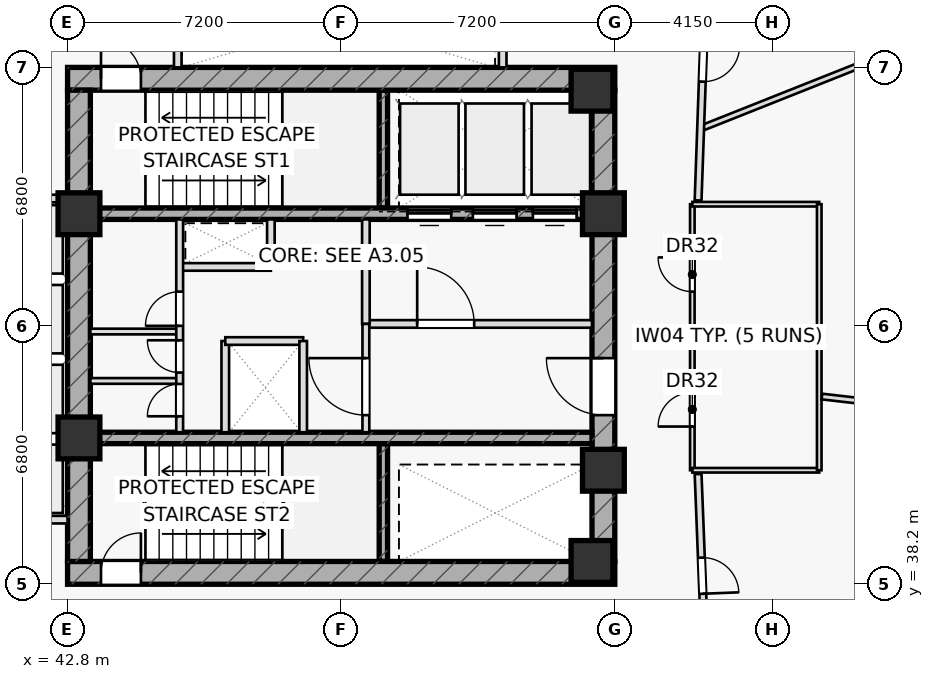
"""IFC4 building model, lengths in metres.
Left out: names, types, materials, properties, quantities, classifications, styles, units other than length and angle.
Written with IfcOpenShell. Run it as: python <this file> out.ifc"""

import sys

from ifc_helpers import new_model, si_unit, direction, frame, frame_2d, origin, origin_2d, place, context, subcontext, project, spatial, rectangle, extrude, element, fill, save


model = new_model("IFC4")
c1 = context("Model", 3, precision=1e-05, world=origin(), true_north=direction((0.0, 1.0)))
c2 = subcontext(c1, "Body", "Model", "MODEL_VIEW")
j1 = project(units=[si_unit("LENGTHUNIT", "METRE"), si_unit("PLANEANGLEUNIT", "RADIAN")], contexts=[c1])
p1 = place(None, origin())
s1 = spatial("IfcSite", under=j1, at=p1, CompositionType="ELEMENT")
p2 = place(p1, origin())
s2 = spatial("IfcBuilding", under=s1, at=p2, CompositionType="ELEMENT")
p3 = place(p2, frame((0.0, 0.0, 74.4)))
s3 = spatial("IfcBuildingStorey", under=s2, at=p3, CompositionType="ELEMENT", Elevation=74.4)
for number, where, z_axis, x_axis in (
    (1, (51.11, 48.1, 0.0), (0.0, 0.0, 1.0), (0.0, 1.0, 0.0)),
    (2, (51.11, 38.8, 0.0), (0.0, 0.0, 1.0), (0.0, 1.0, 0.0)),
):
    element("IfcWall", number, at=place(p3, frame(where, z_axis=z_axis, x_axis=x_axis)), inside=s3, PredefinedType="SHEAR", context=c2, shape_type="SweptSolid", body=[
        extrude(rectangle(XDim=3.1, YDim=0.22, at=frame_2d((1.55, 0.0))), origin(), (0.0, 0.0, 1.0), 3.6),
    ])
p4 = place(p3, frame((42.8, 51.5, 0.0), z_axis=(0.0, 0.0, 1.0), x_axis=(1.0, 0.0, 0.0)))
e3 = element("IfcWall", 3, at=p4, inside=s3, PredefinedType="SHEAR", context=c2, shape_type="SweptSolid", body=[
    extrude(rectangle(XDim=14.4, YDim=0.6, at=frame_2d((7.2, 0.0))), origin(), (0.0, 0.0, 1.0), 3.6),
])
p5 = place(p4, frame((0.88, 0.0, 0.0)))
e4 = element("IfcOpeningElement", 4, at=p5, cuts=e3, PredefinedType="OPENING", context=c2, shape_type="SweptSolid", body=[
    extrude(rectangle(XDim=1.05, YDim=2.2, at=frame_2d((0.525, 1.1))), frame((0.0, 0.31, 0.0), z_axis=(0.0, -1.0, 0.0), x_axis=(1.0, 0.0, 0.0)), (0.0, 0.0, 1.0), 0.62),
])
p6 = place(p3, frame((42.8, 38.5, 0.0), z_axis=(0.0, 0.0, 1.0), x_axis=(1.0, 0.0, 0.0)))
e5 = element("IfcWall", 5, at=p6, inside=s3, PredefinedType="SHEAR", context=c2, shape_type="SweptSolid", body=[
    extrude(rectangle(XDim=14.4, YDim=0.6, at=frame_2d((7.2, 0.0))), origin(), (0.0, 0.0, 1.0), 3.6),
])
p7 = place(p6, frame((0.88, 0.0, 0.0)))
e6 = element("IfcOpeningElement", 6, at=p7, cuts=e5, PredefinedType="OPENING", context=c2, shape_type="SweptSolid", body=[
    extrude(rectangle(XDim=1.05, YDim=2.2, at=frame_2d((0.525, 1.1))), frame((0.0, 0.31, 0.0), z_axis=(0.0, -1.0, 0.0), x_axis=(1.0, 0.0, 0.0)), (0.0, 0.0, 1.0), 0.62),
])
p8 = place(p3, frame((43.1, 38.8, 0.0), z_axis=(0.0, 0.0, 1.0), x_axis=(0.0, 1.0, 0.0)))
e7 = element("IfcWall", 7, at=p8, inside=s3, PredefinedType="SHEAR", context=c2, shape_type="SweptSolid", body=[
    extrude(rectangle(XDim=12.4, YDim=0.6, at=frame_2d((6.2, 0.0))), origin(), (0.0, 0.0, 1.0), 3.6),
])
p9 = place(p3, frame((56.9, 38.8, 0.0), z_axis=(0.0, 0.0, 1.0), x_axis=(0.0, 1.0, 0.0)))
e8 = element("IfcWall", 8, at=p9, inside=s3, PredefinedType="SHEAR", context=c2, shape_type="SweptSolid", body=[
    extrude(rectangle(XDim=12.4, YDim=0.6, at=frame_2d((6.2, 0.0))), origin(), (0.0, 0.0, 1.0), 3.6),
])
p10 = place(p9, frame((3.85, 0.0, 0.0)))
e9 = element("IfcOpeningElement", 9, at=p10, cuts=e8, PredefinedType="OPENING", context=c2, shape_type="SweptSolid", body=[
    extrude(rectangle(XDim=1.5, YDim=2.2, at=frame_2d((0.75, 1.1))), frame((0.0, 0.31, 0.0), z_axis=(0.0, -1.0, 0.0), x_axis=(1.0, 0.0, 0.0)), (0.0, 0.0, 1.0), 0.62),
])
p11 = place(p3, frame((43.4, 47.95, 0.0), z_axis=(0.0, 0.0, 1.0), x_axis=(1.0, 0.0, 0.0)))
e10 = element("IfcWall", 10, at=p11, inside=s3, PredefinedType="SHEAR", context=c2, shape_type="SweptSolid", body=[
    extrude(rectangle(XDim=13.2, YDim=0.3, at=frame_2d((6.6, 0.0))), origin(), (0.0, 0.0, 1.0), 3.6),
])
p12 = place(p11, frame((8.345, 0.0, 0.0)))
e11 = element("IfcOpeningElement", 11, at=p12, cuts=e10, PredefinedType="OPENING", context=c2, shape_type="SweptSolid", body=[
    extrude(rectangle(XDim=1.15, YDim=2.2, at=frame_2d((0.575, 1.1))), frame((0.0, 0.16, 0.0), z_axis=(0.0, -1.0, 0.0), x_axis=(1.0, 0.0, 0.0)), (0.0, 0.0, 1.0), 0.32),
])
p13 = place(p11, frame((10.065, 0.0, 0.0)))
e12 = element("IfcOpeningElement", 12, at=p13, cuts=e10, PredefinedType="OPENING", context=c2, shape_type="SweptSolid", body=[
    extrude(rectangle(XDim=1.15, YDim=2.2, at=frame_2d((0.575, 1.1))), frame((0.0, 0.16, 0.0), z_axis=(0.0, -1.0, 0.0), x_axis=(1.0, 0.0, 0.0)), (0.0, 0.0, 1.0), 0.32),
])
p14 = place(p11, frame((11.645, 0.0, 0.0)))
e13 = element("IfcOpeningElement", 13, at=p14, cuts=e10, PredefinedType="OPENING", context=c2, shape_type="SweptSolid", body=[
    extrude(rectangle(XDim=1.15, YDim=2.2, at=frame_2d((0.575, 1.1))), frame((0.0, 0.16, 0.0), z_axis=(0.0, -1.0, 0.0), x_axis=(1.0, 0.0, 0.0)), (0.0, 0.0, 1.0), 0.32),
])
p15 = place(p3, frame((43.4, 42.05, 0.0), z_axis=(0.0, 0.0, 1.0), x_axis=(1.0, 0.0, 0.0)))
e14 = element("IfcWall", 14, at=p15, inside=s3, PredefinedType="SHEAR", context=c2, shape_type="SweptSolid", body=[
    extrude(rectangle(XDim=13.2, YDim=0.3, at=frame_2d((6.6, 0.0))), origin(), (0.0, 0.0, 1.0), 3.6),
])
for number, where, z_axis, x_axis in (
    (15, (43.1, 47.95, 0.0), (0.0, 0.0, 1.0), (1.0, 0.0, 0.0)),
    (16, (56.9, 47.95, 0.0), (0.0, 0.0, 1.0), (1.0, 0.0, 0.0)),
    (17, (56.6, 51.2, 0.0), (0.0, 0.0, 1.0), (1.0, 0.0, 0.0)),
    (18, (43.1, 42.05, 0.0), (0.0, 0.0, 1.0), (1.0, 0.0, 0.0)),
    (19, (56.9, 41.2, 0.0), (0.0, 0.0, 1.0), (1.0, 0.0, 0.0)),
    (20, (56.6, 38.8, 0.0), (0.0, 0.0, 1.0), (1.0, 0.0, 0.0)),
):
    element("IfcColumn", number, at=place(p3, frame(where, z_axis=z_axis, x_axis=x_axis)), inside=s3, PredefinedType="COLUMN", context=c2, shape_type="SweptSolid", body=[
        extrude(rectangle(XDim=1.1, YDim=1.1, at=origin_2d()), origin(), (0.0, 0.0, 1.0), 3.6),
    ])
for number, where, z_axis, x_axis in (
    (21, (40.3, 39.9, 0.0), (0.0, 0.0, 1.0), (1.0, 0.0, 0.0)),
    (22, (40.3, 48.35, 0.0), (0.0, 0.0, 1.0), (1.0, 0.0, 0.0)),
    (23, (45.7, 51.8, 0.0), (0.0, 0.0, 1.0), (0.0, 1.0, 0.0)),
    (24, (54.25, 51.8, 0.0), (0.0, 0.0, 1.0), (0.0, 1.0, 0.0)),
):
    element("IfcWall", number, at=place(p3, frame(where, z_axis=z_axis, x_axis=x_axis)), inside=s3, PredefinedType="PARTITIONING", context=c2, shape_type="SweptSolid", body=[
        extrude(rectangle(XDim=2.5, YDim=0.2, at=frame_2d((1.25, 0.0))), origin(), (0.0, 0.0, 1.0), 3.6),
    ])
p16 = place(p3, frame((45.75, 46.55, 0.0), z_axis=(0.0, 0.0, 1.0), x_axis=(1.0, 0.0, 0.0)))
e25 = element("IfcWall", 25, at=p16, inside=s3, PredefinedType="PARTITIONING", context=c2, shape_type="SweptSolid", body=[
    extrude(rectangle(XDim=2.4, YDim=0.2, at=frame_2d((1.2, 0.0))), origin(), (0.0, 0.0, 1.0), 3.6),
])
p17 = place(p3, frame((48.15, 46.55, 0.0), z_axis=(0.0, 0.0, 1.0), x_axis=(0.0, 1.0, 0.0)))
e26 = element("IfcWall", 26, at=p17, inside=s3, PredefinedType="PARTITIONING", context=c2, shape_type="SweptSolid", body=[
    extrude(rectangle(XDim=1.25, YDim=0.2, at=frame_2d((0.625, 0.0))), origin(), (0.0, 0.0, 1.0), 3.6),
])
p18 = place(p3, frame((46.95, 42.2, 0.0), z_axis=(0.0, 0.0, 1.0), x_axis=(0.0, 1.0, 0.0)))
e27 = element("IfcWall", 27, at=p18, inside=s3, PredefinedType="PARTITIONING", context=c2, shape_type="SweptSolid", body=[
    extrude(rectangle(XDim=2.4, YDim=0.2, at=frame_2d((1.2, 0.0))), origin(), (0.0, 0.0, 1.0), 3.6),
])
p19 = place(p3, frame((46.95, 44.6, 0.0), z_axis=(0.0, 0.0, 1.0), x_axis=(1.0, 0.0, 0.0)))
e28 = element("IfcWall", 28, at=p19, inside=s3, PredefinedType="PARTITIONING", context=c2, shape_type="SweptSolid", body=[
    extrude(rectangle(XDim=2.05, YDim=0.2, at=frame_2d((1.025, 0.0))), origin(), (0.0, 0.0, 1.0), 3.6),
])
p20 = place(p3, frame((50.65, 45.05, 0.0), z_axis=(0.0, 0.0, 1.0), x_axis=(1.0, 0.0, 0.0)))
e29 = element("IfcWall", 29, at=p20, inside=s3, PredefinedType="PARTITIONING", context=c2, shape_type="SweptSolid", body=[
    extrude(rectangle(XDim=5.95, YDim=0.2, at=frame_2d((2.975, 0.0))), origin(), (0.0, 0.0, 1.0), 3.6),
])
p21 = place(p20, frame((1.35, 0.0, 0.0)))
e30 = element("IfcOpeningElement", 30, at=p21, cuts=e29, PredefinedType="OPENING", context=c2, shape_type="SweptSolid", body=[
    extrude(rectangle(XDim=1.5, YDim=2.2, at=frame_2d((0.75, 1.1))), frame((0.0, 0.11, 0.0), z_axis=(0.0, -1.0, 0.0), x_axis=(1.0, 0.0, 0.0)), (0.0, 0.0, 1.0), 0.22),
])
p22 = place(p3, frame((50.65, 45.05, 0.0), z_axis=(0.0, 0.0, 1.0), x_axis=(0.0, 1.0, 0.0)))
e31 = element("IfcWall", 31, at=p22, inside=s3, PredefinedType="PARTITIONING", context=c2, shape_type="SweptSolid", body=[
    extrude(rectangle(XDim=2.75, YDim=0.2, at=frame_2d((1.375, 0.0))), origin(), (0.0, 0.0, 1.0), 3.6),
])
p23 = place(p3, frame((50.65, 42.2, 0.0), z_axis=(0.0, 0.0, 1.0), x_axis=(0.0, 1.0, 0.0)))
e32 = element("IfcWall", 32, at=p23, inside=s3, PredefinedType="PARTITIONING", context=c2, shape_type="SweptSolid", body=[
    extrude(rectangle(XDim=2.85, YDim=0.18, at=frame_2d((1.425, 0.0))), origin(), (0.0, 0.0, 1.0), 3.6),
])
p24 = place(p23, frame((0.45, 0.0, 0.0)))
e33 = element("IfcOpeningElement", 33, at=p24, cuts=e32, PredefinedType="OPENING", context=c2, shape_type="SweptSolid", body=[
    extrude(rectangle(XDim=1.5, YDim=2.2, at=frame_2d((0.75, 1.1))), frame((0.0, 0.1, 0.0), z_axis=(0.0, -1.0, 0.0), x_axis=(1.0, 0.0, 0.0)), (0.0, 0.0, 1.0), 0.2),
])
for number, where, z_axis, x_axis in (
    (34, (43.4, 43.55, 0.0), (0.0, 0.0, 1.0), (1.0, 0.0, 0.0)),
    (35, (43.4, 44.85, 0.0), (0.0, 0.0, 1.0), (1.0, 0.0, 0.0)),
):
    element("IfcWall", number, at=place(p3, frame(where, z_axis=z_axis, x_axis=x_axis)), inside=s3, PredefinedType="PARTITIONING", context=c2, shape_type="SweptSolid", body=[
        extrude(rectangle(XDim=2.35, YDim=0.15, at=frame_2d((1.175, 0.0))), origin(), (0.0, 0.0, 1.0), 3.6),
    ])
p25 = place(p3, frame((45.75, 42.2, 0.0), z_axis=(0.0, 0.0, 1.0), x_axis=(0.0, 1.0, 0.0)))
e36 = element("IfcWall", 36, at=p25, inside=s3, PredefinedType="PARTITIONING", context=c2, shape_type="SweptSolid", body=[
    extrude(rectangle(XDim=5.6, YDim=0.18, at=frame_2d((2.8, 0.0))), origin(), (0.0, 0.0, 1.0), 3.6),
])
p26 = place(p25, frame((0.42, 0.0, 0.0)))
e37 = element("IfcOpeningElement", 37, at=p26, cuts=e36, PredefinedType="OPENING", context=c2, shape_type="SweptSolid", body=[
    extrude(rectangle(XDim=0.85, YDim=2.05, at=frame_2d((0.425, 1.025))), frame((0.0, 0.1, 0.0), z_axis=(0.0, -1.0, 0.0), x_axis=(1.0, 0.0, 0.0)), (0.0, 0.0, 1.0), 0.2),
])
p27 = place(p25, frame((1.57, 0.0, 0.0)))
e38 = element("IfcOpeningElement", 38, at=p27, cuts=e36, PredefinedType="OPENING", context=c2, shape_type="SweptSolid", body=[
    extrude(rectangle(XDim=0.85, YDim=2.05, at=frame_2d((0.425, 1.025))), frame((0.0, 0.1, 0.0), z_axis=(0.0, -1.0, 0.0), x_axis=(1.0, 0.0, 0.0)), (0.0, 0.0, 1.0), 0.2),
])
p28 = place(p25, frame((2.8, 0.0, 0.0)))
e39 = element("IfcOpeningElement", 39, at=p28, cuts=e36, PredefinedType="OPENING", context=c2, shape_type="SweptSolid", body=[
    extrude(rectangle(XDim=0.9, YDim=2.05, at=frame_2d((0.45, 1.025))), frame((0.0, 0.1, 0.0), z_axis=(0.0, -1.0, 0.0), x_axis=(1.0, 0.0, 0.0)), (0.0, 0.0, 1.0), 0.2),
])
p29 = place(p3, frame((59.24, 41.2, 0.0), z_axis=(0.0, 0.0, 1.0), x_axis=(0.0, 1.0, 0.0)))
e40 = element("IfcWall", 40, at=p29, inside=s3, PredefinedType="PARTITIONING", context=c2, shape_type="SweptSolid", body=[
    extrude(rectangle(XDim=7.0, YDim=0.12, at=frame_2d((3.5, 0.0))), origin(), (0.0, 0.0, 1.0), 3.6),
])
p30 = place(p29, frame((1.15, 0.0, 0.0)))
e41 = element("IfcOpeningElement", 41, at=p30, cuts=e40, PredefinedType="OPENING", context=c2, shape_type="SweptSolid", body=[
    extrude(rectangle(XDim=0.9, YDim=2.05, at=frame_2d((0.45, 1.025))), frame((0.0, 0.07, 0.0), z_axis=(0.0, -1.0, 0.0), x_axis=(1.0, 0.0, 0.0)), (0.0, 0.0, 1.0), 0.14),
])
p31 = place(p29, frame((4.7, 0.0, 0.0)))
e42 = element("IfcOpeningElement", 42, at=p31, cuts=e40, PredefinedType="OPENING", context=c2, shape_type="SweptSolid", body=[
    extrude(rectangle(XDim=0.9, YDim=2.05, at=frame_2d((0.45, 1.025))), frame((0.0, 0.07, 0.0), z_axis=(0.0, -1.0, 0.0), x_axis=(1.0, 0.0, 0.0)), (0.0, 0.0, 1.0), 0.14),
])
p32 = place(p3, frame((59.24, 41.2, 0.0), z_axis=(0.0, 0.0, 1.0), x_axis=(1.0, 0.0, 0.0)))
e43 = element("IfcWall", 43, at=p32, inside=s3, PredefinedType="PARTITIONING", context=c2, shape_type="SweptSolid", body=[
    extrude(rectangle(XDim=3.34, YDim=0.12, at=frame_2d((1.67, 0.0))), origin(), (0.0, 0.0, 1.0), 2.975),
])
for number, where, z_axis, x_axis in (
    (44, (59.24, 44.65, 0.0), (0.0, 0.0, 1.0), (1.0, 0.0, 0.0)),
    (45, (59.24, 48.2, 0.0), (0.0, 0.0, 1.0), (1.0, 0.0, 0.0)),
):
    element("IfcWall", number, at=place(p3, frame(where, z_axis=z_axis, x_axis=x_axis)), inside=s3, PredefinedType="PARTITIONING", context=c2, shape_type="SweptSolid", body=[
        extrude(rectangle(XDim=3.34, YDim=0.12, at=frame_2d((1.67, 0.0))), origin(), (0.0, 0.0, 1.0), 3.6),
    ])
p33 = place(p3, frame((62.58, 41.2, 0.0), z_axis=(0.0, 0.0, 1.0), x_axis=(0.0, 1.0, 0.0)))
e46 = element("IfcWall", 46, at=p33, inside=s3, PredefinedType="PARTITIONING", context=c2, shape_type="SweptSolid", body=[
    extrude(rectangle(XDim=7.0, YDim=0.12, at=frame_2d((3.5, 0.0))), origin(), (0.0, 0.0, 1.0), 3.6),
])
p34 = place(p3, frame((62.65, 43.139, 0.0), z_axis=(0.0, 0.0, 1.0), x_axis=(0.993507819436, -0.113763846275, 0.0)))
e47 = element("IfcWall", 47, at=p34, inside=s3, PredefinedType="PARTITIONING", context=c2, shape_type="SweptSolid", body=[
    extrude(rectangle(XDim=13.121, YDim=0.15, at=frame_2d((6.561, 0.0))), origin(), (0.0, 0.0, 1.0), 2.975),
])
p35 = place(p34, frame((1.35, 0.0, 0.0)))
e48 = element("IfcOpeningElement", 48, at=p35, cuts=e47, PredefinedType="OPENING", context=c2, shape_type="SweptSolid", body=[
    extrude(rectangle(XDim=0.95, YDim=2.05, at=frame_2d((0.475, 1.025))), frame((0.0, 0.085, 0.0), z_axis=(0.0, -1.0, 0.0), x_axis=(1.0, 0.0, 0.0)), (0.0, 0.0, 1.0), 0.17),
])
p36 = place(p3, frame((59.458, 50.191, 0.0), z_axis=(0.0, 0.0, 1.0), x_axis=(0.929265937883, 0.369411446344, 0.0)))
e49 = element("IfcWall", 49, at=p36, inside=s3, PredefinedType="PARTITIONING", context=c2, shape_type="SweptSolid", body=[
    extrude(rectangle(XDim=12.191, YDim=0.15, at=frame_2d((6.096, 0.0))), origin(), (0.0, 0.0, 1.0), 2.975),
])
p37 = place(p3, frame((59.602, 54.25, 0.0), z_axis=(0.0, 0.0, 1.0), x_axis=(-0.035265891834, -0.999377964973, 0.0)))
e50 = element("IfcWall", 50, at=p37, inside=s3, PredefinedType="PARTITIONING", context=c2, shape_type="SweptSolid", body=[
    extrude(rectangle(XDim=5.954, YDim=0.18, at=frame_2d((2.977, 0.0))), origin(), (0.0, 0.0, 1.0), 2.975),
])
p38 = place(p37, frame((1.876, 0.0, 0.0)))
e51 = element("IfcOpeningElement", 51, at=p38, cuts=e50, PredefinedType="OPENING", context=c2, shape_type="SweptSolid", body=[
    extrude(rectangle(XDim=0.95, YDim=2.05, at=frame_2d((0.475, 1.025))), frame((0.0, 0.1, 0.0), z_axis=(0.0, -1.0, 0.0), x_axis=(1.0, 0.0, 0.0)), (0.0, 0.0, 1.0), 0.2),
])
p39 = place(p3, frame((59.392, 41.1, 0.0), z_axis=(0.0, 0.0, 1.0), x_axis=(0.03921413315, -0.999230830069, 0.0)))
e52 = element("IfcWall", 52, at=p39, inside=s3, PredefinedType="PARTITIONING", context=c2, shape_type="SweptSolid", body=[
    extrude(rectangle(XDim=5.354, YDim=0.18, at=frame_2d((2.677, 0.0))), origin(), (0.0, 0.0, 1.0), 2.975),
])
p40 = place(p39, frame((2.202, 0.0, 0.0)))
e53 = element("IfcOpeningElement", 53, at=p40, cuts=e52, PredefinedType="OPENING", context=c2, shape_type="SweptSolid", body=[
    extrude(rectangle(XDim=0.95, YDim=2.05, at=frame_2d((0.475, 1.025))), frame((0.0, 0.1, 0.0), z_axis=(0.0, -1.0, 0.0), x_axis=(1.0, 0.0, 0.0)), (0.0, 0.0, 1.0), 0.2),
])
p41 = place(p3, frame((49.0, 42.2, 0.0), z_axis=(0.0, 0.0, 1.0), x_axis=(0.0, 1.0, 0.0)))
e54 = element("IfcWall", 54, at=p41, inside=s3, PredefinedType="PARTITIONING", context=c2, shape_type="SweptSolid", body=[
    extrude(rectangle(XDim=2.4, YDim=0.2, at=frame_2d((1.2, 0.0))), origin(), (0.0, 0.0, 1.0), 3.6),
])
p42 = place(p5, origin())
e55 = element("IfcDoor", 55, at=p42, inside=s3, OperationType="SINGLE_SWING_LEFT", PredefinedType="DOOR", context=c2, shape_type="SweptSolid", body=[
    extrude(rectangle(XDim=1.05, YDim=2.2, at=frame_2d((0.525, 1.1))), frame((0.0, 0.025, 0.0), z_axis=(0.0, -1.0, 0.0), x_axis=(1.0, 0.0, 0.0)), (0.0, 0.0, 1.0), 0.05),
])
fill(e4, e55)
p43 = place(p7, origin())
e56 = element("IfcDoor", 56, at=p43, inside=s3, OperationType="SINGLE_SWING_RIGHT", PredefinedType="DOOR", context=c2, shape_type="SweptSolid", body=[
    extrude(rectangle(XDim=1.05, YDim=2.2, at=frame_2d((0.525, 1.1))), frame((0.0, 0.025, 0.0), z_axis=(0.0, -1.0, 0.0), x_axis=(1.0, 0.0, 0.0)), (0.0, 0.0, 1.0), 0.05),
])
fill(e6, e56)
p44 = place(p10, origin())
e57 = element("IfcDoor", 57, at=p44, inside=s3, OperationType="SINGLE_SWING_RIGHT", PredefinedType="DOOR", context=c2, shape_type="SweptSolid", body=[
    extrude(rectangle(XDim=1.5, YDim=2.2, at=frame_2d((0.75, 1.1))), frame((0.0, 0.025, 0.0), z_axis=(0.0, -1.0, 0.0), x_axis=(1.0, 0.0, 0.0)), (0.0, 0.0, 1.0), 0.05),
])
fill(e9, e57)
p45 = place(p21, origin())
e58 = element("IfcDoor", 58, at=p45, inside=s3, OperationType="SINGLE_SWING_LEFT", PredefinedType="DOOR", context=c2, shape_type="SweptSolid", body=[
    extrude(rectangle(XDim=1.5, YDim=2.2, at=frame_2d((0.75, 1.1))), frame((0.0, 0.025, 0.0), z_axis=(0.0, -1.0, 0.0), x_axis=(1.0, 0.0, 0.0)), (0.0, 0.0, 1.0), 0.05),
])
fill(e30, e58)
p46 = place(p24, origin())
e59 = element("IfcDoor", 59, at=p46, inside=s3, OperationType="SINGLE_SWING_RIGHT", PredefinedType="DOOR", context=c2, shape_type="SweptSolid", body=[
    extrude(rectangle(XDim=1.5, YDim=2.2, at=frame_2d((0.75, 1.1))), frame((0.0, 0.025, 0.0), z_axis=(0.0, -1.0, 0.0), x_axis=(1.0, 0.0, 0.0)), (0.0, 0.0, 1.0), 0.05),
])
fill(e33, e59)
p47 = place(p26, origin())
e60 = element("IfcDoor", 60, at=p47, inside=s3, OperationType="SINGLE_SWING_LEFT", PredefinedType="DOOR", context=c2, shape_type="SweptSolid", body=[
    extrude(rectangle(XDim=0.85, YDim=2.05, at=frame_2d((0.425, 1.025))), frame((0.0, 0.025, 0.0), z_axis=(0.0, -1.0, 0.0), x_axis=(1.0, 0.0, 0.0)), (0.0, 0.0, 1.0), 0.05),
])
fill(e37, e60)
p48 = place(p27, origin())
e61 = element("IfcDoor", 61, at=p48, inside=s3, OperationType="SINGLE_SWING_RIGHT", PredefinedType="DOOR", context=c2, shape_type="SweptSolid", body=[
    extrude(rectangle(XDim=0.85, YDim=2.05, at=frame_2d((0.425, 1.025))), frame((0.0, 0.025, 0.0), z_axis=(0.0, -1.0, 0.0), x_axis=(1.0, 0.0, 0.0)), (0.0, 0.0, 1.0), 0.05),
])
fill(e38, e61)
p49 = place(p28, origin())
e62 = element("IfcDoor", 62, at=p49, inside=s3, OperationType="SINGLE_SWING_LEFT", PredefinedType="DOOR", context=c2, shape_type="SweptSolid", body=[
    extrude(rectangle(XDim=0.9, YDim=2.05, at=frame_2d((0.45, 1.025))), frame((0.0, 0.025, 0.0), z_axis=(0.0, -1.0, 0.0), x_axis=(1.0, 0.0, 0.0)), (0.0, 0.0, 1.0), 0.05),
])
fill(e39, e62)
p50 = place(p30, origin())
e63 = element("IfcDoor", 63, at=p50, inside=s3, OperationType="SINGLE_SWING_LEFT", PredefinedType="DOOR", context=c2, shape_type="SweptSolid", body=[
    extrude(rectangle(XDim=0.9, YDim=2.05, at=frame_2d((0.45, 1.025))), frame((0.0, 0.025, 0.0), z_axis=(0.0, -1.0, 0.0), x_axis=(1.0, 0.0, 0.0)), (0.0, 0.0, 1.0), 0.05),
])
fill(e41, e63)
p51 = place(p31, origin())
e64 = element("IfcDoor", 64, at=p51, inside=s3, OperationType="SINGLE_SWING_RIGHT", PredefinedType="DOOR", context=c2, shape_type="SweptSolid", body=[
    extrude(rectangle(XDim=0.9, YDim=2.05, at=frame_2d((0.45, 1.025))), frame((0.0, 0.025, 0.0), z_axis=(0.0, -1.0, 0.0), x_axis=(1.0, 0.0, 0.0)), (0.0, 0.0, 1.0), 0.05),
])
fill(e42, e64)
p52 = place(p38, origin())
e65 = element("IfcDoor", 65, at=p52, inside=s3, OperationType="SINGLE_SWING_LEFT", PredefinedType="DOOR", context=c2, shape_type="SweptSolid", body=[
    extrude(rectangle(XDim=0.95, YDim=2.05, at=frame_2d((0.475, 1.025))), frame((0.0, 0.025, 0.0), z_axis=(0.0, -1.0, 0.0), x_axis=(1.0, 0.0, 0.0)), (0.0, 0.0, 1.0), 0.05),
])
fill(e51, e65)
p53 = place(p40, origin())
e66 = element("IfcDoor", 66, at=p53, inside=s3, OperationType="SINGLE_SWING_RIGHT", PredefinedType="DOOR", context=c2, shape_type="SweptSolid", body=[
    extrude(rectangle(XDim=0.95, YDim=2.05, at=frame_2d((0.475, 1.025))), frame((0.0, 0.025, 0.0), z_axis=(0.0, -1.0, 0.0), x_axis=(1.0, 0.0, 0.0)), (0.0, 0.0, 1.0), 0.05),
])
fill(e53, e66)
p54 = place(p12, origin())
e67 = element("IfcDoor", 67, at=p54, inside=s3, OperationType="SLIDING_TO_LEFT", PredefinedType="DOOR", context=c2, shape_type="SweptSolid", body=[
    extrude(rectangle(XDim=1.15, YDim=2.2, at=frame_2d((0.575, 1.1))), frame((0.0, 0.025, 0.0), z_axis=(0.0, -1.0, 0.0), x_axis=(1.0, 0.0, 0.0)), (0.0, 0.0, 1.0), 0.05),
])
fill(e11, e67)
p55 = place(p13, origin())
e68 = element("IfcDoor", 68, at=p55, inside=s3, OperationType="SLIDING_TO_LEFT", PredefinedType="DOOR", context=c2, shape_type="SweptSolid", body=[
    extrude(rectangle(XDim=1.15, YDim=2.2, at=frame_2d((0.575, 1.1))), frame((0.0, 0.025, 0.0), z_axis=(0.0, -1.0, 0.0), x_axis=(1.0, 0.0, 0.0)), (0.0, 0.0, 1.0), 0.05),
])
fill(e12, e68)
p56 = place(p14, origin())
e69 = element("IfcDoor", 69, at=p56, inside=s3, OperationType="SLIDING_TO_LEFT", PredefinedType="DOOR", context=c2, shape_type="SweptSolid", body=[
    extrude(rectangle(XDim=1.15, YDim=2.2, at=frame_2d((0.575, 1.1))), frame((0.0, 0.025, 0.0), z_axis=(0.0, -1.0, 0.0), x_axis=(1.0, 0.0, 0.0)), (0.0, 0.0, 1.0), 0.05),
])
fill(e13, e69)
save(model, sys.argv[1])
